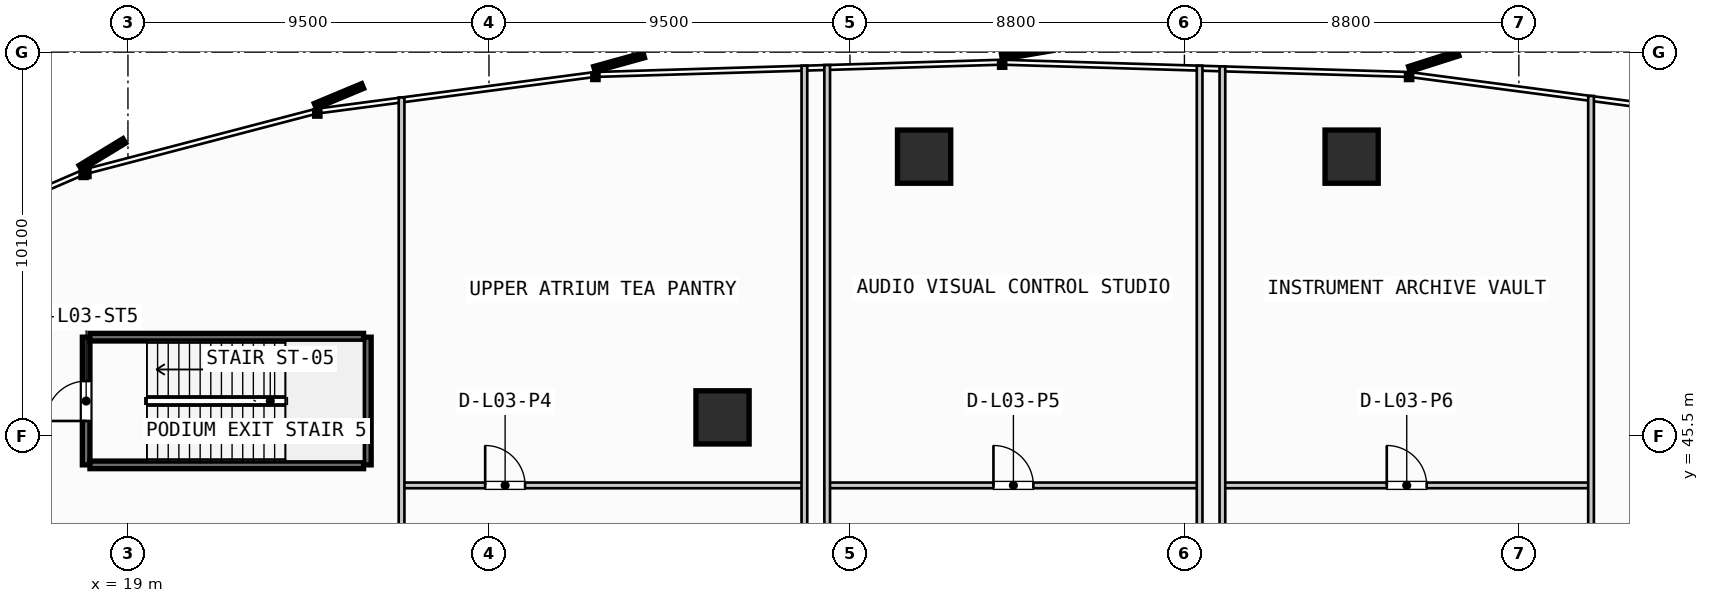
"""IFC4 building model, lengths in metres.
Left out: names, types, materials, properties, quantities, classifications, styles, units other than length and angle.
Written with IfcOpenShell. Run it as: python <this file> out.ifc"""

import sys

from ifc_helpers import new_model, si_unit, direction, frame, frame_2d, origin, origin_2d, place, context, subcontext, project, spatial, rectangle, hollow_rectangle, extrude, source, transform, mapped, element, fill, save


model = new_model("IFC4")
c1 = context("Model", 3, precision=1e-05, world=origin(), true_north=direction((0.0, 1.0)))
c2 = subcontext(c1, "Body", "Model", "MODEL_VIEW")
j1 = project(units=[si_unit("LENGTHUNIT", "METRE"), si_unit("PLANEANGLEUNIT", "RADIAN")], contexts=[c1])
p1 = place(None, origin())
s1 = spatial("IfcSite", under=j1, at=p1, CompositionType="ELEMENT")
p2 = place(p1, origin())
s2 = spatial("IfcBuilding", under=s1, at=p2, CompositionType="ELEMENT")
p3 = place(p2, frame((0.0, 0.0, 14.8)))
s3 = spatial("IfcBuildingStorey", under=s2, at=p3, CompositionType="ELEMENT", Elevation=14.8)
m1 = source(origin(), c2, "Body", "SweptSolid", [
    extrude(hollow_rectangle(XDim=1.4, YDim=1.4, WallThickness=0.05, InnerFilletRadius=0.025, OuterFilletRadius=0.075, at=origin_2d()), origin(), (0.0, 0.0, 1.0), 4.53),
])
for number, where, z_axis, x_axis in (
    (1, (51.2, 52.85, 0.0), (0.0, 0.0, 1.0), (1.0, 0.0, 0.0)),
    (2, (39.95, 52.85, 0.0), (0.0, 0.0, 1.0), (1.0, 0.0, 0.0)),
    (3, (34.646, 45.99, 0.0), (0.0, 0.0, 1.0), (1.0, 0.0, 0.0)),
):
    element("IfcColumn", number, at=place(p3, frame(where, z_axis=z_axis, x_axis=x_axis)), inside=s3, PredefinedType="COLUMN", context=c2, shape_type="MappedRepresentation", body=[
        mapped(m1, transform((0.0, 0.0, 0.0), scale=1.0)),
    ])
p4 = place(p3, frame((17.9, 44.74, 0.0), z_axis=(0.0, 0.0, 1.0), x_axis=(0.0, 1.0, 0.0)))
e4 = element("IfcWall", 4, at=p4, inside=s3, PredefinedType="SHEAR", context=c2, shape_type="SweptSolid", body=[
    extrude(rectangle(XDim=3.36, YDim=0.2, at=frame_2d((1.68, 0.0))), origin(), (0.0, 0.0, 1.0), 4.53),
])
p5 = place(p4, frame((1.155, 0.0, 0.0)))
e5 = element("IfcOpeningElement", 5, at=p5, cuts=e4, PredefinedType="OPENING", context=c2, shape_type="SweptSolid", body=[
    extrude(rectangle(XDim=1.05, YDim=2.15, at=frame_2d((0.525, 1.075))), frame((0.0, 0.11, 0.0), z_axis=(0.0, -1.0, 0.0), x_axis=(1.0, 0.0, 0.0)), (0.0, 0.0, 1.0), 0.22),
])
p6 = place(p3, frame((25.3, 48.1, 0.0), z_axis=(0.0, 0.0, 1.0), x_axis=(0.0, -1.0, 0.0)))
e6 = element("IfcWall", 6, at=p6, inside=s3, PredefinedType="SHEAR", context=c2, shape_type="SweptSolid", body=[
    extrude(rectangle(XDim=3.36, YDim=0.2, at=frame_2d((1.68, 0.0))), origin(), (0.0, 0.0, 1.0), 4.53),
])
for number, where, z_axis, x_axis in (
    (7, (25.2, 44.74, 0.0), (0.0, 0.0, 1.0), (-1.0, 0.0, 0.0)),
    (8, (18.0, 48.1, 0.0), (0.0, 0.0, 1.0), (1.0, 0.0, 0.0)),
):
    element("IfcWall", number, at=place(p3, frame(where, z_axis=z_axis, x_axis=x_axis)), inside=s3, PredefinedType="SHEAR", context=c2, shape_type="SweptSolid", body=[
        extrude(rectangle(XDim=7.2, YDim=0.2, at=frame_2d((3.6, 0.0))), origin(), (0.0, 0.0, 1.0), 4.53),
    ])
p7 = place(p3, frame((26.2, 44.2, 0.0), z_axis=(0.0, 0.0, 1.0), x_axis=(1.0, 0.0, 0.0)))
e9 = element("IfcWall", 9, at=p7, inside=s3, PredefinedType="PARTITIONING", context=c2, shape_type="SweptSolid", body=[
    extrude(rectangle(XDim=10.6, YDim=0.15, at=frame_2d((5.3, 0.0))), origin(), (0.0, 0.0, 1.0), 3.743),
])
p8 = place(p7, frame((2.2, 0.0, 0.0)))
e10 = element("IfcOpeningElement", 10, at=p8, cuts=e9, PredefinedType="OPENING", context=c2, shape_type="SweptSolid", body=[
    extrude(rectangle(XDim=1.05, YDim=2.15, at=frame_2d((0.525, 1.075))), frame((0.0, 0.085, 0.0), z_axis=(0.0, -1.0, 0.0), x_axis=(1.0, 0.0, 0.0)), (0.0, 0.0, 1.0), 0.17),
])
p9 = place(p3, frame((26.2, 42.2, 0.0), z_axis=(0.0, 0.0, 1.0), x_axis=(0.0, 1.0, 0.0)))
e11 = element("IfcWall", 11, at=p9, inside=s3, PredefinedType="PARTITIONING", context=c2, shape_type="SweptSolid", body=[
    extrude(rectangle(XDim=12.207, YDim=0.15, at=frame_2d((6.104, 0.0))), origin(), (0.0, 0.0, 1.0), 3.743),
])
p10 = place(p3, frame((36.8, 42.2, 0.0), z_axis=(0.0, 0.0, 1.0), x_axis=(0.0, 1.0, 0.0)))
e12 = element("IfcWall", 12, at=p10, inside=s3, PredefinedType="PARTITIONING", context=c2, shape_type="SweptSolid", body=[
    extrude(rectangle(XDim=13.043, YDim=0.15, at=frame_2d((6.521, 0.0))), origin(), (0.0, 0.0, 1.0), 3.743),
])
p11 = place(p3, frame((37.4, 44.2, 0.0), z_axis=(0.0, 0.0, 1.0), x_axis=(1.0, 0.0, 0.0)))
e13 = element("IfcWall", 13, at=p11, inside=s3, PredefinedType="PARTITIONING", context=c2, shape_type="SweptSolid", body=[
    extrude(rectangle(XDim=9.8, YDim=0.15, at=frame_2d((4.9, 0.0))), origin(), (0.0, 0.0, 1.0), 3.743),
])
p12 = place(p11, frame((4.375, 0.0, 0.0)))
e14 = element("IfcOpeningElement", 14, at=p12, cuts=e13, PredefinedType="OPENING", context=c2, shape_type="SweptSolid", body=[
    extrude(rectangle(XDim=1.05, YDim=2.15, at=frame_2d((0.525, 1.075))), frame((0.0, 0.085, 0.0), z_axis=(0.0, -1.0, 0.0), x_axis=(1.0, 0.0, 0.0)), (0.0, 0.0, 1.0), 0.17),
])
p13 = place(p3, frame((37.4, 42.2, 0.0), z_axis=(0.0, 0.0, 1.0), x_axis=(0.0, 1.0, 0.0)))
e15 = element("IfcWall", 15, at=p13, inside=s3, PredefinedType="PARTITIONING", context=c2, shape_type="SweptSolid", body=[
    extrude(rectangle(XDim=13.061, YDim=0.15, at=frame_2d((6.531, 0.0))), origin(), (0.0, 0.0, 1.0), 3.743),
])
p14 = place(p3, frame((47.2, 42.2, 0.0), z_axis=(0.0, 0.0, 1.0), x_axis=(0.0, 1.0, 0.0)))
e16 = element("IfcWall", 16, at=p14, inside=s3, PredefinedType="PARTITIONING", context=c2, shape_type="SweptSolid", body=[
    extrude(rectangle(XDim=13.043, YDim=0.15, at=frame_2d((6.521, 0.0))), origin(), (0.0, 0.0, 1.0), 3.743),
])
p15 = place(p3, frame((47.8, 44.2, 0.0), z_axis=(0.0, 0.0, 1.0), x_axis=(1.0, 0.0, 0.0)))
e17 = element("IfcWall", 17, at=p15, inside=s3, PredefinedType="PARTITIONING", context=c2, shape_type="SweptSolid", body=[
    extrude(rectangle(XDim=9.7, YDim=0.15, at=frame_2d((4.85, 0.0))), origin(), (0.0, 0.0, 1.0), 3.743),
])
p16 = place(p15, frame((4.325, 0.0, 0.0)))
e18 = element("IfcOpeningElement", 18, at=p16, cuts=e17, PredefinedType="OPENING", context=c2, shape_type="SweptSolid", body=[
    extrude(rectangle(XDim=1.05, YDim=2.15, at=frame_2d((0.525, 1.075))), frame((0.0, 0.085, 0.0), z_axis=(0.0, -1.0, 0.0), x_axis=(1.0, 0.0, 0.0)), (0.0, 0.0, 1.0), 0.17),
])
p17 = place(p3, frame((47.8, 42.2, 0.0), z_axis=(0.0, 0.0, 1.0), x_axis=(0.0, 1.0, 0.0)))
e19 = element("IfcWall", 19, at=p17, inside=s3, PredefinedType="PARTITIONING", context=c2, shape_type="SweptSolid", body=[
    extrude(rectangle(XDim=13.025, YDim=0.15, at=frame_2d((6.513, 0.0))), origin(), (0.0, 0.0, 1.0), 3.743),
])
p18 = place(p3, frame((57.5, 42.2, 0.0), z_axis=(0.0, 0.0, 1.0), x_axis=(0.0, 1.0, 0.0)))
e20 = element("IfcWall", 20, at=p18, inside=s3, PredefinedType="PARTITIONING", context=c2, shape_type="SweptSolid", body=[
    extrude(rectangle(XDim=12.247, YDim=0.15, at=frame_2d((6.123, 0.0))), origin(), (0.0, 0.0, 1.0), 3.743),
])
m2 = source(origin(), c2, "Body", "SweptSolid", [
    extrude(rectangle(XDim=1.05, YDim=2.15, at=frame_2d((0.525, 1.075))), frame((0.0, 0.025, 0.0), z_axis=(0.0, -1.0, 0.0), x_axis=(1.0, 0.0, 0.0)), (0.0, 0.0, 1.0), 0.05),
])
p19 = place(p5, origin())
e21 = element("IfcDoor", 21, at=p19, inside=s3, OperationType="SINGLE_SWING_LEFT", PredefinedType="DOOR", context=c2, shape_type="MappedRepresentation", body=[
    mapped(m2, transform((0.0, 0.0, 0.0), scale=1.0)),
])
fill(e5, e21)
p20 = place(p8, origin())
e22 = element("IfcDoor", 22, at=p20, inside=s3, OperationType="SINGLE_SWING_LEFT", PredefinedType="DOOR", context=c2, shape_type="MappedRepresentation", body=[
    mapped(m2, transform((0.0, 0.0, 0.0), scale=1.0)),
])
fill(e10, e22)
p21 = place(p12, origin())
e23 = element("IfcDoor", 23, at=p21, inside=s3, OperationType="SINGLE_SWING_LEFT", PredefinedType="DOOR", context=c2, shape_type="MappedRepresentation", body=[
    mapped(m2, transform((0.0, 0.0, 0.0), scale=1.0)),
])
fill(e14, e23)
p22 = place(p16, origin())
e24 = element("IfcDoor", 24, at=p22, inside=s3, OperationType="SINGLE_SWING_LEFT", PredefinedType="DOOR", context=c2, shape_type="MappedRepresentation", body=[
    mapped(m2, transform((0.0, 0.0, 0.0), scale=1.0)),
])
fill(e18, e24)
save(model, sys.argv[1])
